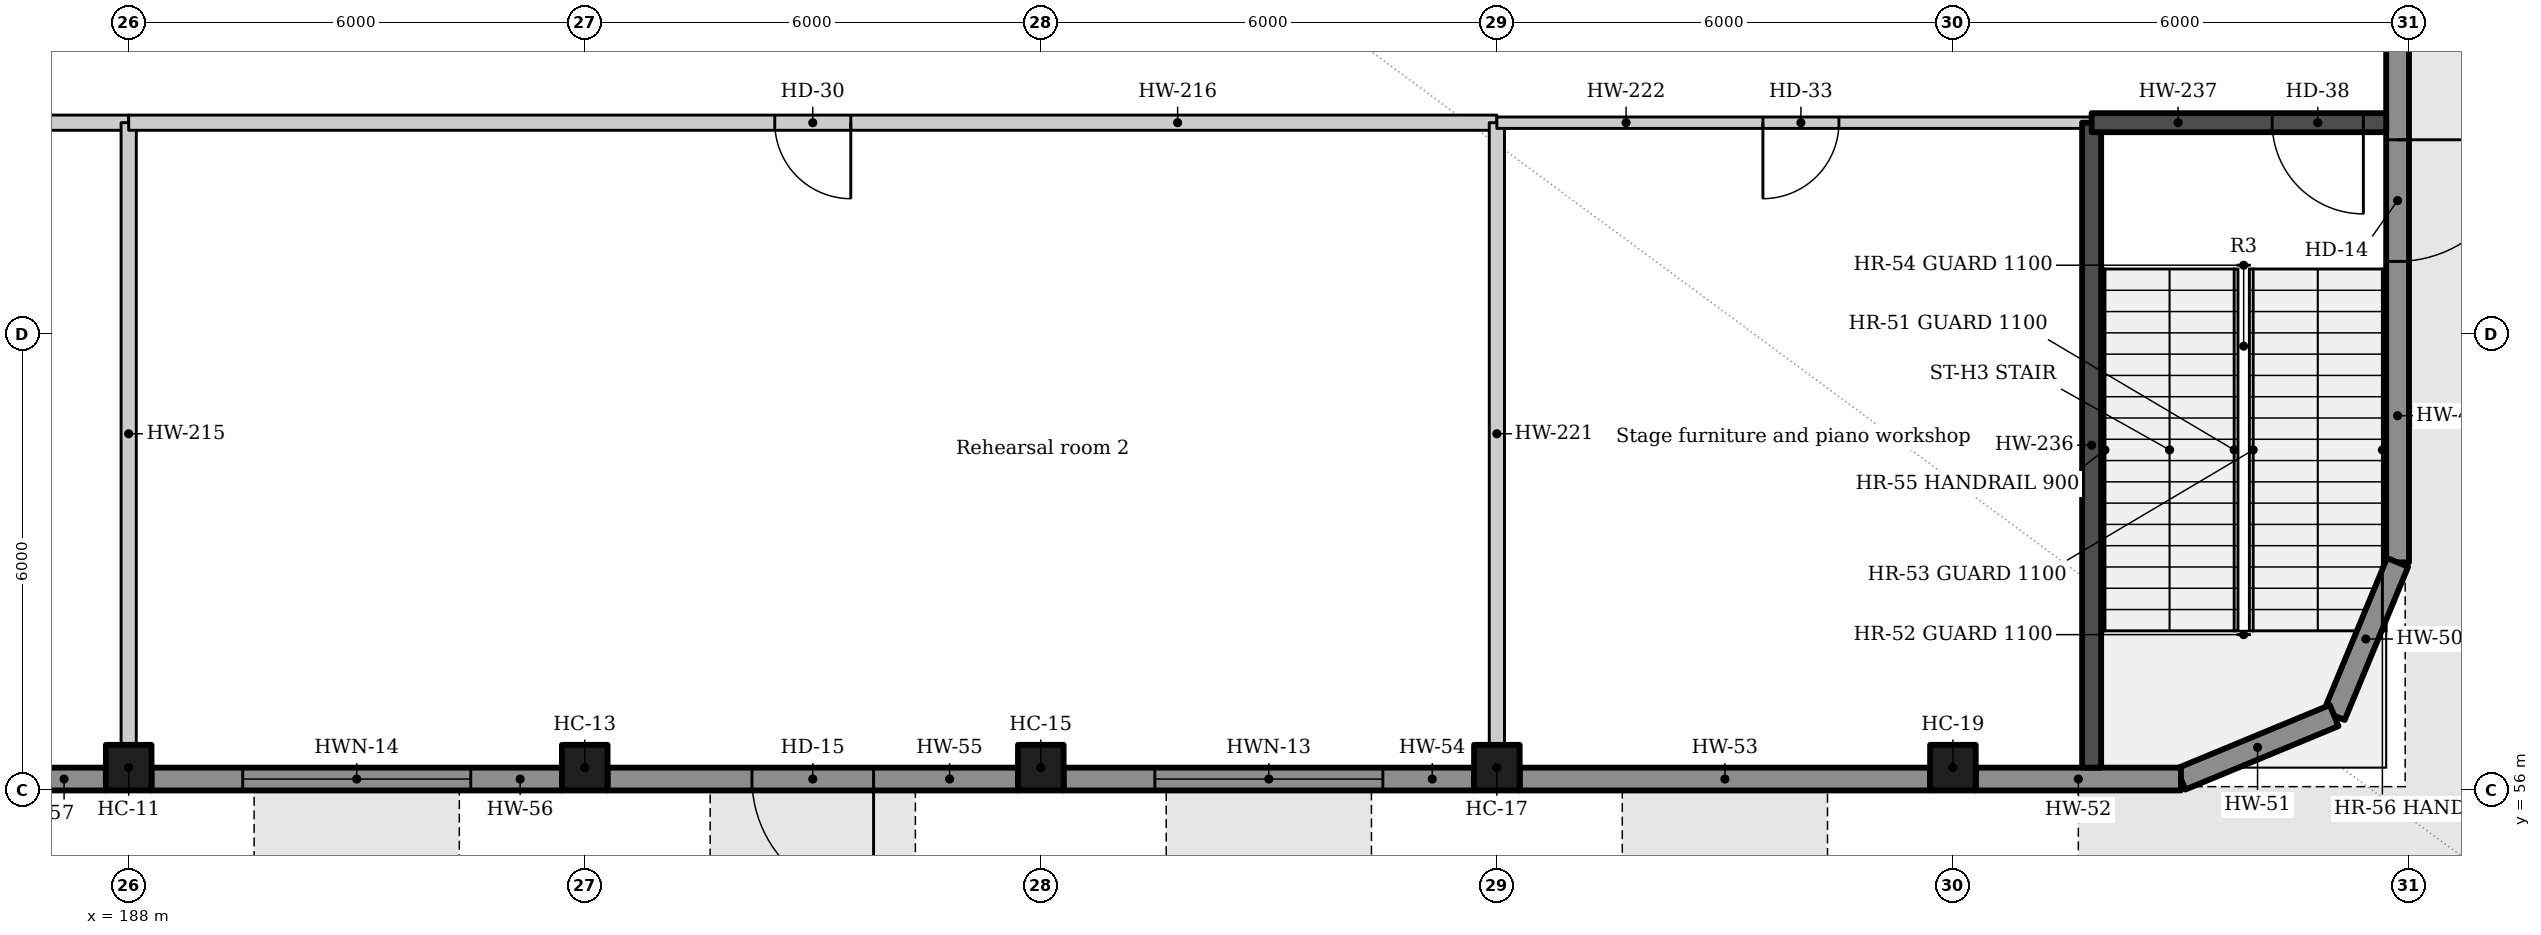
"""IFC4 building model, lengths in metres.
Left out: names, types, materials, properties, quantities, classifications, styles, units other than length and angle.
Written with IfcOpenShell. Run it as: python <this file> out.ifc"""

import sys

from ifc_helpers import new_model, si_unit, direction, frame, frame_2d, origin, origin_2d, place, context, subcontext, project, spatial, rectangle, extrude, element, fill, save


model = new_model("IFC4")
c1 = context("Model", 3, precision=1e-05, world=origin(), true_north=direction((0.0, 1.0)))
c2 = subcontext(c1, "Body", "Model", "MODEL_VIEW")
j1 = project(units=[si_unit("LENGTHUNIT", "METRE"), si_unit("PLANEANGLEUNIT", "RADIAN")], contexts=[c1])
p1 = place(None, origin())
s1 = spatial("IfcSite", under=j1, at=p1, CompositionType="ELEMENT")
p2 = place(p1, origin())
s2 = spatial("IfcBuilding", under=s1, at=p2, CompositionType="ELEMENT")
p3 = place(p2, origin())
s3 = spatial("IfcBuildingStorey", under=s2, at=p3, CompositionType="ELEMENT", Elevation=0.0)
for number, where, z_axis, x_axis in (
    (1, (188.0, 56.3, 0.0), (0.0, 0.0, 1.0), (1.0, 0.0, 0.0)),
    (2, (194.0, 56.3, 0.0), (0.0, 0.0, 1.0), (1.0, 0.0, 0.0)),
    (3, (200.0, 56.3, 0.0), (0.0, 0.0, 1.0), (1.0, 0.0, 0.0)),
    (4, (206.0, 56.3, 0.0), (0.0, 0.0, 1.0), (1.0, 0.0, 0.0)),
    (5, (212.0, 56.3, 0.0), (0.0, 0.0, 1.0), (1.0, 0.0, 0.0)),
):
    element("IfcColumn", number, at=place(p3, frame(where, z_axis=z_axis, x_axis=x_axis)), inside=s3, PredefinedType="COLUMN", context=c2, shape_type="SweptSolid", body=[
        extrude(rectangle(XDim=0.6, YDim=0.6, at=origin_2d()), origin(), (0.0, 0.0, 1.0), 6.6),
    ])
p4 = place(p3, frame((217.85, 67.7, 0.0), z_axis=(0.0, 0.0, 1.0), x_axis=(0.0, -1.0, 0.0)))
e6 = element("IfcWall", 6, at=p4, inside=s3, PredefinedType="SOLIDWALL", context=c2, shape_type="SweptSolid", body=[
    extrude(rectangle(XDim=8.7, YDim=0.3, at=frame_2d((4.35, 0.0))), origin(), (0.0, 0.0, 1.0), 6.6),
])
p5 = place(p4, frame((3.14, 0.0, 0.0)))
e7 = element("IfcOpeningElement", 7, at=p5, cuts=e6, PredefinedType="OPENING", context=c2, shape_type="SweptSolid", body=[
    extrude(rectangle(XDim=1.6, YDim=2.4, at=frame_2d((0.8, 1.2))), frame((0.0, 0.16, 0.0), z_axis=(0.0, -1.0, 0.0), x_axis=(1.0, 0.0, 0.0)), (0.0, 0.0, 1.0), 0.32),
])
for number, where, z_axis, x_axis in (
    (8, (217.85, 59.0, 0.0), (0.0, 0.0, 1.0), (-0.383, -0.924, 0.0)),
    (9, (217.015, 56.985, 0.0), (0.0, 0.0, 1.0), (-0.924, -0.383, 0.0)),
):
    element("IfcWall", number, at=place(p3, frame(where, z_axis=z_axis, x_axis=x_axis)), inside=s3, PredefinedType="SOLIDWALL", context=c2, shape_type="SweptSolid", body=[
        extrude(rectangle(XDim=2.181, YDim=0.3, at=frame_2d((1.091, 0.0))), origin(), (0.0, 0.0, 1.0), 6.6),
    ])
p6 = place(p3, frame((215.0, 56.15, 0.0), z_axis=(0.0, 0.0, 1.0), x_axis=(-1.0, 0.0, 0.0)))
e10 = element("IfcWall", 10, at=p6, inside=s3, PredefinedType="SOLIDWALL", context=c2, shape_type="SweptSolid", body=[
    extrude(rectangle(XDim=2.7, YDim=0.3, at=frame_2d((1.35, 0.0))), origin(), (0.0, 0.0, 1.0), 6.6),
])
p7 = place(p3, frame((211.7, 56.15, 0.0), z_axis=(0.0, 0.0, 1.0), x_axis=(-1.0, 0.0, 0.0)))
e11 = element("IfcWall", 11, at=p7, inside=s3, PredefinedType="SOLIDWALL", context=c2, shape_type="SweptSolid", body=[
    extrude(rectangle(XDim=5.4, YDim=0.3, at=frame_2d((2.7, 0.0))), origin(), (0.0, 0.0, 1.0), 6.6),
])
p8 = place(p3, frame((205.7, 56.15, 0.0), z_axis=(0.0, 0.0, 1.0), x_axis=(-1.0, 0.0, 0.0)))
e12 = element("IfcWall", 12, at=p8, inside=s3, PredefinedType="SOLIDWALL", context=c2, shape_type="SweptSolid", body=[
    extrude(rectangle(XDim=5.4, YDim=0.3, at=frame_2d((2.7, 0.0))), origin(), (0.0, 0.0, 1.0), 6.6),
])
p9 = place(p8, frame((1.2, 0.0, 0.9)))
e13 = element("IfcOpeningElement", 13, at=p9, cuts=e12, PredefinedType="OPENING", context=c2, shape_type="SweptSolid", body=[
    extrude(rectangle(XDim=3.0, YDim=1.8, at=frame_2d((1.5, 0.9))), frame((0.0, 0.16, 0.0), z_axis=(0.0, -1.0, 0.0), x_axis=(1.0, 0.0, 0.0)), (0.0, 0.0, 1.0), 0.32),
])
p10 = place(p3, frame((199.7, 56.15, 0.0), z_axis=(0.0, 0.0, 1.0), x_axis=(-1.0, 0.0, 0.0)))
e14 = element("IfcWall", 14, at=p10, inside=s3, PredefinedType="SOLIDWALL", context=c2, shape_type="SweptSolid", body=[
    extrude(rectangle(XDim=5.4, YDim=0.3, at=frame_2d((2.7, 0.0))), origin(), (0.0, 0.0, 1.0), 6.6),
])
p11 = place(p10, frame((1.9, 0.0, 0.0)))
e15 = element("IfcOpeningElement", 15, at=p11, cuts=e14, PredefinedType="OPENING", context=c2, shape_type="SweptSolid", body=[
    extrude(rectangle(XDim=1.6, YDim=2.4, at=frame_2d((0.8, 1.2))), frame((0.0, 0.16, 0.0), z_axis=(0.0, -1.0, 0.0), x_axis=(1.0, 0.0, 0.0)), (0.0, 0.0, 1.0), 0.32),
])
p12 = place(p3, frame((193.7, 56.15, 0.0), z_axis=(0.0, 0.0, 1.0), x_axis=(-1.0, 0.0, 0.0)))
e16 = element("IfcWall", 16, at=p12, inside=s3, PredefinedType="SOLIDWALL", context=c2, shape_type="SweptSolid", body=[
    extrude(rectangle(XDim=5.4, YDim=0.3, at=frame_2d((2.7, 0.0))), origin(), (0.0, 0.0, 1.0), 6.6),
])
p13 = place(p12, frame((1.2, 0.0, 0.9)))
e17 = element("IfcOpeningElement", 17, at=p13, cuts=e16, PredefinedType="OPENING", context=c2, shape_type="SweptSolid", body=[
    extrude(rectangle(XDim=3.0, YDim=1.8, at=frame_2d((1.5, 0.9))), frame((0.0, 0.16, 0.0), z_axis=(0.0, -1.0, 0.0), x_axis=(1.0, 0.0, 0.0)), (0.0, 0.0, 1.0), 0.32),
])
p14 = place(p3, frame((187.7, 56.15, 0.0), z_axis=(0.0, 0.0, 1.0), x_axis=(-1.0, 0.0, 0.0)))
e18 = element("IfcWall", 18, at=p14, inside=s3, PredefinedType="SOLIDWALL", context=c2, shape_type="SweptSolid", body=[
    extrude(rectangle(XDim=5.4, YDim=0.3, at=frame_2d((2.7, 0.0))), origin(), (0.0, 0.0, 1.0), 6.6),
])
p15 = place(p14, frame((1.2, 0.0, 0.9)))
e19 = element("IfcOpeningElement", 19, at=p15, cuts=e18, PredefinedType="OPENING", context=c2, shape_type="SweptSolid", body=[
    extrude(rectangle(XDim=3.0, YDim=1.8, at=frame_2d((1.5, 0.9))), frame((0.0, 0.16, 0.0), z_axis=(0.0, -1.0, 0.0), x_axis=(1.0, 0.0, 0.0)), (0.0, 0.0, 1.0), 0.32),
])
p16 = place(p3, frame((188.0, 64.785, 0.0), z_axis=(0.0, 0.0, 1.0), x_axis=(-1.0, 0.0, 0.0)))
e20 = element("IfcWall", 20, at=p16, inside=s3, PredefinedType="PARTITIONING", context=c2, shape_type="SweptSolid", body=[
    extrude(rectangle(XDim=18.0, YDim=0.2, at=frame_2d((9.0, 0.0))), origin(), (0.0, 0.0, 1.0), 6.25),
])
p17 = place(p16, frame((8.5, 0.0, 0.0)))
e21 = element("IfcOpeningElement", 21, at=p17, cuts=e20, PredefinedType="OPENING", context=c2, shape_type="SweptSolid", body=[
    extrude(rectangle(XDim=1.0, YDim=2.1, at=frame_2d((0.5, 1.05))), frame((0.0, 0.11, 0.0), z_axis=(0.0, -1.0, 0.0), x_axis=(1.0, 0.0, 0.0)), (0.0, 0.0, 1.0), 0.22),
])
p18 = place(p3, frame((188.0, 64.785, 0.0), z_axis=(0.0, 0.0, 1.0), x_axis=(0.0, -1.0, 0.0)))
e22 = element("IfcWall", 22, at=p18, inside=s3, PredefinedType="PARTITIONING", context=c2, shape_type="SweptSolid", body=[
    extrude(rectangle(XDim=8.185, YDim=0.2, at=frame_2d((4.092, 0.0))), origin(), (0.0, 0.0, 1.0), 6.25),
])
p19 = place(p3, frame((206.0, 64.785, 0.0), z_axis=(0.0, 0.0, 1.0), x_axis=(-1.0, 0.0, 0.0)))
e23 = element("IfcWall", 23, at=p19, inside=s3, PredefinedType="PARTITIONING", context=c2, shape_type="SweptSolid", body=[
    extrude(rectangle(XDim=18.0, YDim=0.2, at=frame_2d((9.0, 0.0))), origin(), (0.0, 0.0, 1.0), 6.25),
])
p20 = place(p19, frame((8.5, 0.0, 0.0)))
e24 = element("IfcOpeningElement", 24, at=p20, cuts=e23, PredefinedType="OPENING", context=c2, shape_type="SweptSolid", body=[
    extrude(rectangle(XDim=1.0, YDim=2.1, at=frame_2d((0.5, 1.05))), frame((0.0, 0.11, 0.0), z_axis=(0.0, -1.0, 0.0), x_axis=(1.0, 0.0, 0.0)), (0.0, 0.0, 1.0), 0.22),
])
p21 = place(p3, frame((206.0, 64.785, 0.0), z_axis=(0.0, 0.0, 1.0), x_axis=(0.0, -1.0, 0.0)))
e25 = element("IfcWall", 25, at=p21, inside=s3, PredefinedType="PARTITIONING", context=c2, shape_type="SweptSolid", body=[
    extrude(rectangle(XDim=8.185, YDim=0.2, at=frame_2d((4.092, 0.0))), origin(), (0.0, 0.0, 1.0), 6.25),
])
p22 = place(p3, frame((213.825, 64.785, 0.0), z_axis=(0.0, 0.0, 1.0), x_axis=(-1.0, 0.0, 0.0)))
e26 = element("IfcWall", 26, at=p22, inside=s3, PredefinedType="PARTITIONING", context=c2, shape_type="SweptSolid", body=[
    extrude(rectangle(XDim=7.825, YDim=0.15, at=frame_2d((3.913, 0.0))), origin(), (0.0, 0.0, 1.0), 6.25),
])
p23 = place(p22, frame((3.325, 0.0, 0.0)))
e27 = element("IfcOpeningElement", 27, at=p23, cuts=e26, PredefinedType="OPENING", context=c2, shape_type="SweptSolid", body=[
    extrude(rectangle(XDim=1.0, YDim=2.1, at=frame_2d((0.5, 1.05))), frame((0.0, 0.085, 0.0), z_axis=(0.0, -1.0, 0.0), x_axis=(1.0, 0.0, 0.0)), (0.0, 0.0, 1.0), 0.17),
])
p24 = place(p3, frame((213.825, 56.3, 0.0), z_axis=(0.0, 0.0, 1.0), x_axis=(0.0, 1.0, 0.0)))
e28 = element("IfcWall", 28, at=p24, inside=s3, PredefinedType="SOLIDWALL", context=c2, shape_type="SweptSolid", body=[
    extrude(rectangle(XDim=8.485, YDim=0.25, at=frame_2d((4.242, 0.0))), origin(), (0.0, 0.0, 1.0), 6.6),
])
p25 = place(p3, frame((217.7, 64.785, 0.0), z_axis=(0.0, 0.0, 1.0), x_axis=(-1.0, 0.0, 0.0)))
e29 = element("IfcWall", 29, at=p25, inside=s3, PredefinedType="SOLIDWALL", context=c2, shape_type="SweptSolid", body=[
    extrude(rectangle(XDim=3.875, YDim=0.25, at=frame_2d((1.938, 0.0))), origin(), (0.0, 0.0, 1.0), 6.6),
])
p26 = place(p25, frame((0.3, 0.0, 0.0)))
e30 = element("IfcOpeningElement", 30, at=p26, cuts=e29, PredefinedType="OPENING", context=c2, shape_type="SweptSolid", body=[
    extrude(rectangle(XDim=1.2, YDim=2.1, at=frame_2d((0.6, 1.05))), frame((0.0, 0.135, 0.0), z_axis=(0.0, -1.0, 0.0), x_axis=(1.0, 0.0, 0.0)), (0.0, 0.0, 1.0), 0.27),
])
p27 = place(p5, origin())
e31 = element("IfcDoor", 31, at=p27, inside=s3, OperationType="SINGLE_SWING_LEFT", PredefinedType="DOOR", context=c2, shape_type="SweptSolid", body=[
    extrude(rectangle(XDim=1.6, YDim=2.4, at=frame_2d((0.8, 1.2))), frame((0.0, 0.025, 0.0), z_axis=(0.0, -1.0, 0.0), x_axis=(1.0, 0.0, 0.0)), (0.0, 0.0, 1.0), 0.05),
])
fill(e7, e31)
p28 = place(p9, origin())
e32 = element("IfcWindow", 32, at=p28, inside=s3, PartitioningType="SINGLE_PANEL", PredefinedType="WINDOW", context=c2, shape_type="SweptSolid", body=[
    extrude(rectangle(XDim=3.0, YDim=1.8, at=frame_2d((1.5, 0.9))), frame((0.0, 0.03, 0.0), z_axis=(0.0, -1.0, 0.0), x_axis=(1.0, 0.0, 0.0)), (0.0, 0.0, 1.0), 0.06),
])
fill(e13, e32)
p29 = place(p11, origin())
e33 = element("IfcDoor", 33, at=p29, inside=s3, OperationType="SINGLE_SWING_LEFT", PredefinedType="DOOR", context=c2, shape_type="SweptSolid", body=[
    extrude(rectangle(XDim=1.6, YDim=2.4, at=frame_2d((0.8, 1.2))), frame((0.0, 0.025, 0.0), z_axis=(0.0, -1.0, 0.0), x_axis=(1.0, 0.0, 0.0)), (0.0, 0.0, 1.0), 0.05),
])
fill(e15, e33)
p30 = place(p13, origin())
e34 = element("IfcWindow", 34, at=p30, inside=s3, PartitioningType="SINGLE_PANEL", PredefinedType="WINDOW", context=c2, shape_type="SweptSolid", body=[
    extrude(rectangle(XDim=3.0, YDim=1.8, at=frame_2d((1.5, 0.9))), frame((0.0, 0.03, 0.0), z_axis=(0.0, -1.0, 0.0), x_axis=(1.0, 0.0, 0.0)), (0.0, 0.0, 1.0), 0.06),
])
fill(e17, e34)
p31 = place(p20, origin())
e35 = element("IfcDoor", 35, at=p31, inside=s3, OperationType="SINGLE_SWING_LEFT", PredefinedType="DOOR", context=c2, shape_type="SweptSolid", body=[
    extrude(rectangle(XDim=1.0, YDim=2.1, at=frame_2d((0.5, 1.05))), frame((0.0, 0.025, 0.0), z_axis=(0.0, -1.0, 0.0), x_axis=(1.0, 0.0, 0.0)), (0.0, 0.0, 1.0), 0.05),
])
fill(e24, e35)
p32 = place(p23, origin())
e36 = element("IfcDoor", 36, at=p32, inside=s3, OperationType="SINGLE_SWING_RIGHT", PredefinedType="DOOR", context=c2, shape_type="SweptSolid", body=[
    extrude(rectangle(XDim=1.0, YDim=2.1, at=frame_2d((0.5, 1.05))), frame((0.0, 0.025, 0.0), z_axis=(0.0, -1.0, 0.0), x_axis=(1.0, 0.0, 0.0)), (0.0, 0.0, 1.0), 0.05),
])
fill(e27, e36)
p33 = place(p26, origin())
e37 = element("IfcDoor", 37, at=p33, inside=s3, OperationType="SINGLE_SWING_LEFT", PredefinedType="DOOR", context=c2, shape_type="SweptSolid", body=[
    extrude(rectangle(XDim=1.2, YDim=2.1, at=frame_2d((0.6, 1.05))), frame((0.0, 0.025, 0.0), z_axis=(0.0, -1.0, 0.0), x_axis=(1.0, 0.0, 0.0)), (0.0, 0.0, 1.0), 0.05),
])
fill(e30, e37)
save(model, sys.argv[1])
